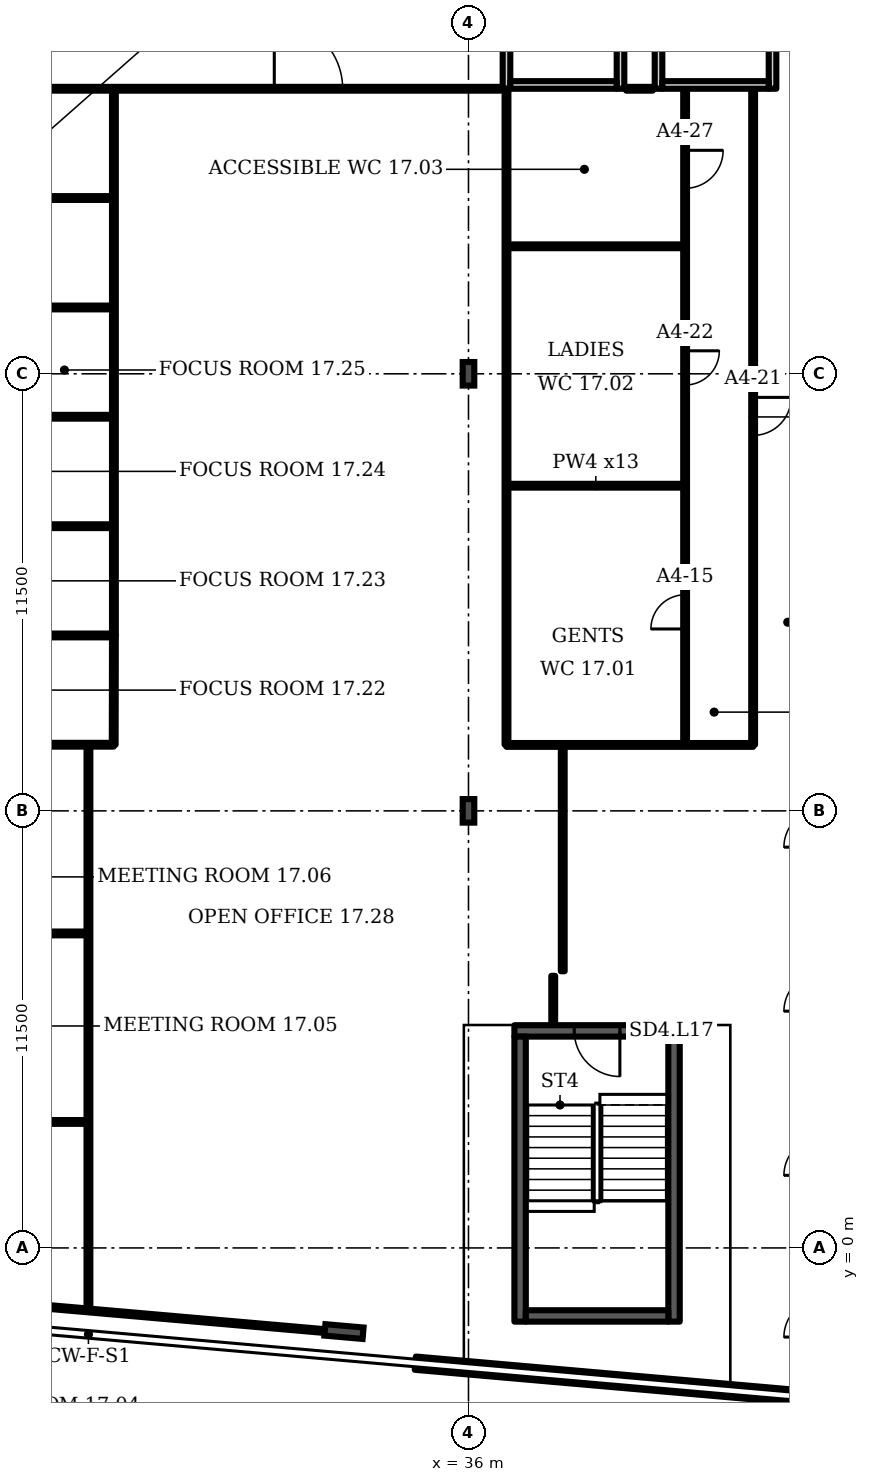
"""IFC4 building model, lengths in metres.
Left out: names, types, materials, properties, quantities, classifications, styles, units other than length and angle.
Written with IfcOpenShell. Run it as: python <this file> out.ifc"""

import sys

from ifc_helpers import new_model, si_unit, direction, frame, frame_2d, origin, origin_2d, place, context, subcontext, project, spatial, rectangle, i_section, extrude, element, fill, save


model = new_model("IFC4")
c1 = context("Model", 3, precision=1e-05, world=origin(), true_north=direction((0.0, 1.0)))
c2 = subcontext(c1, "Body", "Model", "MODEL_VIEW")
j1 = project(units=[si_unit("LENGTHUNIT", "METRE"), si_unit("PLANEANGLEUNIT", "RADIAN")], contexts=[c1])
p1 = place(None, origin())
s1 = spatial("IfcSite", under=j1, at=p1, CompositionType="ELEMENT")
p2 = place(p1, origin())
s2 = spatial("IfcBuilding", under=s1, at=p2, CompositionType="ELEMENT")
p3 = place(p2, frame((0.0, 0.0, 81.1)))
s3 = spatial("IfcBuildingStorey", under=s2, at=p3, CompositionType="ELEMENT", Elevation=81.1)
p4 = place(p3, frame((32.724, -2.2, 0.0), z_axis=(0.0, 0.0, 1.0), x_axis=(-0.087156, -0.996198, 0.0)))
e1 = element("IfcColumn", 1, at=p4, inside=s3, PredefinedType="COLUMN", context=c2, shape_type="SweptSolid", body=[
    extrude(i_section(OverallWidth=0.302, OverallDepth=1.008, WebThickness=0.021, FlangeThickness=0.04, FilletRadius=0.03, at=origin_2d()), origin(), (0.0, 0.0, 1.0), 3.6),
])
for number, where, z_axis, x_axis in (
    (2, (36.0, 11.5, 0.0), (0.0, 0.0, 1.0), (1.0, 0.0, 0.0)),
    (3, (36.0, 23.0, 0.0), (0.0, 0.0, 1.0), (1.0, 0.0, 0.0)),
):
    element("IfcColumn", number, at=place(p3, frame(where, z_axis=z_axis, x_axis=x_axis)), inside=s3, PredefinedType="COLUMN", context=c2, shape_type="SweptSolid", body=[
        extrude(i_section(OverallWidth=0.305, OverallDepth=0.62, WebThickness=0.021, FlangeThickness=0.04, FilletRadius=0.027, at=origin_2d()), origin(), (0.0, 0.0, 1.0), 3.6),
    ])
p5 = place(p3, frame((34.601, -3.032, 0.0), z_axis=(0.0, 0.0, 1.0), x_axis=(0.996193, -0.087148, 0.0)))
e4 = element("IfcWall", 4, at=p5, inside=s3, PredefinedType="SOLIDWALL", context=c2, shape_type="SweptSolid", body=[
    extrude(rectangle(XDim=11.458, YDim=0.35, at=frame_2d((5.729, 0.0))), origin(), (0.0, 0.0, 1.0), 1.0),
])
p6 = place(p3, frame((37.0, 30.5, 0.0), z_axis=(0.0, 0.0, 1.0), x_axis=(0.0, 1.0, 0.0)))
e5 = element("IfcWall", 5, at=p6, inside=s3, PredefinedType="PARTITIONING", context=c2, shape_type="SweptSolid", body=[
    extrude(rectangle(XDim=3.5, YDim=0.2, at=frame_2d((1.75, 0.0))), origin(), (0.0, 0.0, 1.0), 3.2),
])
p7 = place(p6, frame((1.2, 0.0, 0.0)))
e6 = element("IfcOpeningElement", 6, at=p7, cuts=e5, PredefinedType="OPENING", context=c2, shape_type="SweptSolid", body=[
    extrude(rectangle(XDim=1.1, YDim=2.1, at=frame_2d((0.55, 1.05))), frame((0.0, 0.11, 0.0), z_axis=(0.0, -1.0, 0.0), x_axis=(1.0, 0.0, 0.0)), (0.0, 0.0, 1.0), 0.22),
])
p8 = place(p3, frame((40.0, 30.5, 0.0), z_axis=(0.0, 0.0, 1.0), x_axis=(0.0, 1.0, 0.0)))
e7 = element("IfcWall", 7, at=p8, inside=s3, PredefinedType="PARTITIONING", context=c2, shape_type="SweptSolid", body=[
    extrude(rectangle(XDim=3.5, YDim=0.2, at=frame_2d((1.75, 0.0))), origin(), (0.0, 0.0, 1.0), 3.2),
])
p9 = place(p3, frame((37.1, 30.6, 0.0), z_axis=(0.0, 0.0, 1.0), x_axis=(1.0, 0.0, 0.0)))
e8 = element("IfcWall", 8, at=p9, inside=s3, PredefinedType="PARTITIONING", context=c2, shape_type="SweptSolid", body=[
    extrude(rectangle(XDim=2.8, YDim=0.2, at=frame_2d((1.4, 0.0))), origin(), (0.0, 0.0, 1.0), 3.2),
])
p10 = place(p3, frame((41.0, 30.5, 0.0), z_axis=(0.0, 0.0, 1.0), x_axis=(0.0, 1.0, 0.0)))
e9 = element("IfcWall", 9, at=p10, inside=s3, PredefinedType="PARTITIONING", context=c2, shape_type="SweptSolid", body=[
    extrude(rectangle(XDim=3.5, YDim=0.2, at=frame_2d((1.75, 0.0))), origin(), (0.0, 0.0, 1.0), 3.2),
])
p11 = place(p3, frame((44.0, 30.5, 0.0), z_axis=(0.0, 0.0, 1.0), x_axis=(0.0, 1.0, 0.0)))
e10 = element("IfcWall", 10, at=p11, inside=s3, PredefinedType="PARTITIONING", context=c2, shape_type="SweptSolid", body=[
    extrude(rectangle(XDim=3.5, YDim=0.2, at=frame_2d((1.75, 0.0))), origin(), (0.0, 0.0, 1.0), 3.2),
])
p12 = place(p11, frame((1.2, 0.0, 0.0)))
e11 = element("IfcOpeningElement", 11, at=p12, cuts=e10, PredefinedType="OPENING", context=c2, shape_type="SweptSolid", body=[
    extrude(rectangle(XDim=1.1, YDim=2.1, at=frame_2d((0.55, 1.05))), frame((0.0, 0.11, 0.0), z_axis=(0.0, -1.0, 0.0), x_axis=(1.0, 0.0, 0.0)), (0.0, 0.0, 1.0), 0.22),
])
p13 = place(p3, frame((41.1, 30.6, 0.0), z_axis=(0.0, 0.0, 1.0), x_axis=(1.0, 0.0, 0.0)))
e12 = element("IfcWall", 12, at=p13, inside=s3, PredefinedType="PARTITIONING", context=c2, shape_type="SweptSolid", body=[
    extrude(rectangle(XDim=2.8, YDim=0.2, at=frame_2d((1.4, 0.0))), origin(), (0.0, 0.0, 1.0), 3.2),
])
p14 = place(p3, frame((37.208, 5.711, 0.0), z_axis=(0.0, 0.0, 1.0), x_axis=(1.0, 0.0, 0.0)))
e13 = element("IfcWall", 13, at=p14, inside=s3, PredefinedType="SHEAR", context=c2, shape_type="SweptSolid", body=[
    extrude(rectangle(XDim=4.35, YDim=0.3, at=frame_2d((2.175, 0.0))), origin(), (0.0, 0.0, 1.0), 3.2),
])
p15 = place(p14, frame((1.575, 0.0, 0.0)))
e14 = element("IfcOpeningElement", 14, at=p15, cuts=e13, PredefinedType="OPENING", context=c2, shape_type="SweptSolid", body=[
    extrude(rectangle(XDim=1.2, YDim=2.1, at=frame_2d((0.6, 1.05))), frame((0.0, 0.16, 0.0), z_axis=(0.0, -1.0, 0.0), x_axis=(1.0, 0.0, 0.0)), (0.0, 0.0, 1.0), 0.32),
])
for number, where, z_axis, x_axis in (
    (15, (21.94, 3.315, 0.0), (0.0, 0.0, 1.0), (1.0, 0.0, 0.0)),
    (16, (21.94, 8.275, 0.0), (0.0, 0.0, 1.0), (1.0, 0.0, 0.0)),
):
    element("IfcWall", number, at=place(p3, frame(where, z_axis=z_axis, x_axis=x_axis)), inside=s3, PredefinedType="PARTITIONING", context=c2, shape_type="SweptSolid", body=[
        extrude(rectangle(XDim=4.06, YDim=0.1, at=frame_2d((2.03, 0.0))), origin(), (0.0, 0.0, 1.0), 3.2),
    ])
for number, where, z_axis, x_axis in (
    (17, (21.94, 13.24, 0.0), (0.0, 0.0, 1.0), (1.0, 0.0, 0.0)),
    (18, (21.94, 16.115, 0.0), (0.0, 0.0, 1.0), (1.0, 0.0, 0.0)),
    (19, (21.94, 18.99, 0.0), (0.0, 0.0, 1.0), (1.0, 0.0, 0.0)),
    (20, (21.94, 21.87, 0.0), (0.0, 0.0, 1.0), (1.0, 0.0, 0.0)),
    (21, (21.94, 24.745, 0.0), (0.0, 0.0, 1.0), (1.0, 0.0, 0.0)),
    (22, (21.94, 27.625, 0.0), (0.0, 0.0, 1.0), (1.0, 0.0, 0.0)),
):
    element("IfcWall", number, at=place(p3, frame(where, z_axis=z_axis, x_axis=x_axis)), inside=s3, PredefinedType="PARTITIONING", context=c2, shape_type="SweptSolid", body=[
        extrude(rectangle(XDim=4.725, YDim=0.1, at=frame_2d((2.363, 0.0))), origin(), (0.0, 0.0, 1.0), 3.2),
    ])
p16 = place(p3, frame((21.94, 30.5, 0.0), z_axis=(0.0, 0.0, 1.0), x_axis=(1.0, 0.0, 0.0)))
e23 = element("IfcWall", 23, at=p16, inside=s3, PredefinedType="PARTITIONING", context=c2, shape_type="SweptSolid", body=[
    extrude(rectangle(XDim=14.91, YDim=0.1, at=frame_2d((7.455, 0.0))), origin(), (0.0, 0.0, 1.0), 3.2),
])
p17 = place(p16, frame((0.345, 0.0, 0.0)))
e24 = element("IfcOpeningElement", 24, at=p17, cuts=e23, PredefinedType="OPENING", context=c2, shape_type="SweptSolid", body=[
    extrude(rectangle(XDim=1.0, YDim=2.1, at=frame_2d((0.5, 1.05))), frame((0.0, 0.06, 0.0), z_axis=(0.0, -1.0, 0.0), x_axis=(1.0, 0.0, 0.0)), (0.0, 0.0, 1.0), 0.12),
])
p18 = place(p16, frame((8.95, 0.0, 0.0)))
e25 = element("IfcOpeningElement", 25, at=p18, cuts=e23, PredefinedType="OPENING", context=c2, shape_type="SweptSolid", body=[
    extrude(rectangle(XDim=1.8, YDim=2.1, at=frame_2d((0.9, 1.05))), frame((0.0, 0.06, 0.0), z_axis=(0.0, -1.0, 0.0), x_axis=(1.0, 0.0, 0.0)), (0.0, 0.0, 1.0), 0.12),
])
p19 = place(p3, frame((26.0, -1.645, 0.0), z_axis=(0.0, 0.0, 1.0), x_axis=(0.0, 1.0, 0.0)))
e26 = element("IfcWall", 26, at=p19, inside=s3, PredefinedType="PARTITIONING", context=c2, shape_type="SweptSolid", body=[
    extrude(rectangle(XDim=14.885, YDim=0.1, at=frame_2d((7.442, 0.0))), origin(), (0.0, 0.0, 1.0), 3.2),
])
p20 = place(p3, frame((26.665, 13.24, 0.0), z_axis=(0.0, 0.0, 1.0), x_axis=(0.001698, 0.999995, 0.0)))
e27 = element("IfcWall", 27, at=p20, inside=s3, PredefinedType="PARTITIONING", context=c2, shape_type="SweptSolid", body=[
    extrude(rectangle(XDim=2.875, YDim=0.1, at=frame_2d((1.438, 0.0))), origin(), (0.0, 0.0, 1.0), 3.2),
])
p21 = place(p3, frame((26.67, 16.115, 0.0), z_axis=(0.0, 0.0, 1.0), x_axis=(0.0, 1.0, 0.0)))
e28 = element("IfcWall", 28, at=p21, inside=s3, PredefinedType="PARTITIONING", context=c2, shape_type="SweptSolid", body=[
    extrude(rectangle(XDim=14.385, YDim=0.1, at=frame_2d((7.192, 0.0))), origin(), (0.0, 0.0, 1.0), 3.2),
])
p22 = place(p3, frame((33.22, -2.275, 0.0), z_axis=(0.0, 0.0, 1.0), x_axis=(-0.996212, 0.086913, 0.0)))
e29 = element("IfcWall", 29, at=p22, inside=s3, PredefinedType="PARTITIONING", context=c2, shape_type="SweptSolid", body=[
    extrude(rectangle(XDim=11.323, YDim=0.1, at=frame_2d((5.662, 0.0))), origin(), (0.0, 0.0, 1.0), 2.58),
])
p23 = place(p3, frame((37.0, 13.235, 0.0), z_axis=(0.0, 0.0, 1.0), x_axis=(1.0, 0.0, 0.0)))
e30 = element("IfcWall", 30, at=p23, inside=s3, PredefinedType="PARTITIONING", context=c2, shape_type="SweptSolid", body=[
    extrude(rectangle(XDim=6.49, YDim=0.1, at=frame_2d((3.245, 0.0))), origin(), (0.0, 0.0, 1.0), 3.2),
])
p24 = place(p3, frame((37.0, 13.24, 0.0), z_axis=(0.0, 0.0, 1.0), x_axis=(0.0, 1.0, 0.0)))
e31 = element("IfcWall", 31, at=p24, inside=s3, PredefinedType="PARTITIONING", context=c2, shape_type="SweptSolid", body=[
    extrude(rectangle(XDim=17.26, YDim=0.1, at=frame_2d((8.63, 0.0))), origin(), (0.0, 0.0, 1.0), 3.2),
])
for number, where, z_axis, x_axis in (
    (32, (37.0, 20.055, 0.0), (0.0, 0.0, 1.0), (1.0, 0.0, 0.0)),
    (33, (37.0, 26.355, 0.0), (0.0, 0.0, 1.0), (1.0, 0.0, 0.0)),
):
    element("IfcWall", number, at=place(p3, frame(where, z_axis=z_axis, x_axis=x_axis)), inside=s3, PredefinedType="PARTITIONING", context=c2, shape_type="SweptSolid", body=[
        extrude(rectangle(XDim=4.7, YDim=0.1, at=frame_2d((2.35, 0.0))), origin(), (0.0, 0.0, 1.0), 3.2),
    ])
p25 = place(p3, frame((38.23, 5.881, 0.0), z_axis=(0.0, 0.0, 1.0), x_axis=(0.0, 1.0, 0.0)))
e34 = element("IfcWall", 34, at=p25, inside=s3, PredefinedType="PARTITIONING", context=c2, shape_type="SweptSolid", body=[
    extrude(rectangle(XDim=1.279, YDim=0.1, at=frame_2d((0.64, 0.0))), origin(), (0.0, 0.0, 1.0), 3.2),
])
p26 = place(p3, frame((38.48, 7.28, 0.0), z_axis=(0.0, 0.0, 1.0), x_axis=(0.0, 1.0, 0.0)))
e35 = element("IfcWall", 35, at=p26, inside=s3, PredefinedType="PARTITIONING", context=c2, shape_type="SweptSolid", body=[
    extrude(rectangle(XDim=5.955, YDim=0.1, at=frame_2d((2.978, 0.0))), origin(), (0.0, 0.0, 1.0), 3.2),
])
p27 = place(p3, frame((41.7, 13.24, 0.0), z_axis=(0.0, 0.0, 1.0), x_axis=(0.0, 1.0, 0.0)))
e36 = element("IfcWall", 36, at=p27, inside=s3, PredefinedType="PARTITIONING", context=c2, shape_type="SweptSolid", body=[
    extrude(rectangle(XDim=17.25, YDim=0.1, at=frame_2d((8.625, 0.0))), origin(), (0.0, 0.0, 1.0), 3.2),
])
p28 = place(p27, frame((3.046, 0.0, 0.0)))
e37 = element("IfcOpeningElement", 37, at=p28, cuts=e36, PredefinedType="OPENING", context=c2, shape_type="SweptSolid", body=[
    extrude(rectangle(XDim=0.9, YDim=2.1, at=frame_2d((0.45, 1.05))), frame((0.0, 0.06, 0.0), z_axis=(0.0, -1.0, 0.0), x_axis=(1.0, 0.0, 0.0)), (0.0, 0.0, 1.0), 0.12),
])
p29 = place(p27, frame((9.465, 0.0, 0.0)))
e38 = element("IfcOpeningElement", 38, at=p29, cuts=e36, PredefinedType="OPENING", context=c2, shape_type="SweptSolid", body=[
    extrude(rectangle(XDim=0.9, YDim=2.1, at=frame_2d((0.45, 1.05))), frame((0.0, 0.06, 0.0), z_axis=(0.0, -1.0, 0.0), x_axis=(1.0, 0.0, 0.0)), (0.0, 0.0, 1.0), 0.12),
])
p30 = place(p27, frame((14.64, 0.0, 0.0)))
e39 = element("IfcOpeningElement", 39, at=p30, cuts=e36, PredefinedType="OPENING", context=c2, shape_type="SweptSolid", body=[
    extrude(rectangle(XDim=1.0, YDim=2.1, at=frame_2d((0.5, 1.05))), frame((0.0, 0.06, 0.0), z_axis=(0.0, -1.0, 0.0), x_axis=(1.0, 0.0, 0.0)), (0.0, 0.0, 1.0), 0.12),
])
p31 = place(p3, frame((43.49, 13.24, 0.0), z_axis=(0.0, 0.0, 1.0), x_axis=(0.0, 1.0, 0.0)))
e40 = element("IfcWall", 40, at=p31, inside=s3, PredefinedType="PARTITIONING", context=c2, shape_type="SweptSolid", body=[
    extrude(rectangle(XDim=17.25, YDim=0.1, at=frame_2d((8.625, 0.0))), origin(), (0.0, 0.0, 1.0), 3.2),
])
p32 = place(p31, frame((8.139, 0.0, 0.0)))
e41 = element("IfcOpeningElement", 41, at=p32, cuts=e40, PredefinedType="OPENING", context=c2, shape_type="SweptSolid", body=[
    extrude(rectangle(XDim=1.0, YDim=2.1, at=frame_2d((0.5, 1.05))), frame((0.0, 0.06, 0.0), z_axis=(0.0, -1.0, 0.0), x_axis=(1.0, 0.0, 0.0)), (0.0, 0.0, 1.0), 0.12),
])
p33 = place(p3, frame((40.15, 30.5, 0.0), z_axis=(0.0, 0.0, 1.0), x_axis=(1.0, 0.0, 0.0)))
e42 = element("IfcWall", 42, at=p33, inside=s3, PredefinedType="PARTITIONING", context=c2, shape_type="SweptSolid", body=[
    extrude(rectangle(XDim=0.7, YDim=0.1, at=frame_2d((0.35, 0.0))), origin(), (0.0, 0.0, 1.0), 3.2),
])
for number, where, z_axis, x_axis in (
    (43, (37.358, -1.939, 0.0), (0.0, 0.0, 1.0), (0.0, 1.0, 0.0)),
    (44, (41.408, -1.939, 0.0), (0.0, 0.0, 1.0), (0.0, 1.0, 0.0)),
):
    element("IfcWall", number, at=place(p3, frame(where, z_axis=z_axis, x_axis=x_axis)), inside=s3, PredefinedType="SHEAR", context=c2, shape_type="SweptSolid", body=[
        extrude(rectangle(XDim=7.5, YDim=0.3, at=frame_2d((3.75, 0.0))), origin(), (0.0, 0.0, 1.0), 3.2),
    ])
p34 = place(p3, frame((37.508, -1.789, 0.0), z_axis=(0.0, 0.0, 1.0), x_axis=(1.0, 0.0, 0.0)))
e45 = element("IfcWall", 45, at=p34, inside=s3, PredefinedType="SHEAR", context=c2, shape_type="SweptSolid", body=[
    extrude(rectangle(XDim=3.75, YDim=0.3, at=frame_2d((1.875, 0.0))), origin(), (0.0, 0.0, 1.0), 3.2),
])
p35 = place(p15, origin())
e46 = element("IfcDoor", 46, at=p35, inside=s3, OperationType="SINGLE_SWING_RIGHT", PredefinedType="DOOR", context=c2, shape_type="SweptSolid", body=[
    extrude(rectangle(XDim=1.2, YDim=2.1, at=frame_2d((0.6, 1.05))), frame((0.0, 0.025, 0.0), z_axis=(0.0, -1.0, 0.0), x_axis=(1.0, 0.0, 0.0)), (0.0, 0.0, 1.0), 0.05),
])
fill(e14, e46)
p36 = place(p28, origin())
e47 = element("IfcDoor", 47, at=p36, inside=s3, OperationType="SINGLE_SWING_LEFT", PredefinedType="DOOR", context=c2, shape_type="SweptSolid", body=[
    extrude(rectangle(XDim=0.9, YDim=2.1, at=frame_2d((0.45, 1.05))), frame((0.0, 0.025, 0.0), z_axis=(0.0, -1.0, 0.0), x_axis=(1.0, 0.0, 0.0)), (0.0, 0.0, 1.0), 0.05),
])
fill(e37, e47)
p37 = place(p32, origin())
e48 = element("IfcDoor", 48, at=p37, inside=s3, OperationType="SINGLE_SWING_RIGHT", PredefinedType="DOOR", context=c2, shape_type="SweptSolid", body=[
    extrude(rectangle(XDim=1.0, YDim=2.1, at=frame_2d((0.5, 1.05))), frame((0.0, 0.025, 0.0), z_axis=(0.0, -1.0, 0.0), x_axis=(1.0, 0.0, 0.0)), (0.0, 0.0, 1.0), 0.05),
])
fill(e41, e48)
p38 = place(p29, origin())
e49 = element("IfcDoor", 49, at=p38, inside=s3, OperationType="SINGLE_SWING_RIGHT", PredefinedType="DOOR", context=c2, shape_type="SweptSolid", body=[
    extrude(rectangle(XDim=0.9, YDim=2.1, at=frame_2d((0.45, 1.05))), frame((0.0, 0.025, 0.0), z_axis=(0.0, -1.0, 0.0), x_axis=(1.0, 0.0, 0.0)), (0.0, 0.0, 1.0), 0.05),
])
fill(e38, e49)
p39 = place(p30, origin())
e50 = element("IfcDoor", 50, at=p39, inside=s3, OperationType="SINGLE_SWING_RIGHT", PredefinedType="DOOR", context=c2, shape_type="SweptSolid", body=[
    extrude(rectangle(XDim=1.0, YDim=2.1, at=frame_2d((0.5, 1.05))), frame((0.0, 0.025, 0.0), z_axis=(0.0, -1.0, 0.0), x_axis=(1.0, 0.0, 0.0)), (0.0, 0.0, 1.0), 0.05),
])
fill(e39, e50)
p40 = place(p18, origin())
e51 = element("IfcDoor", 51, at=p40, inside=s3, OperationType="DOUBLE_DOOR_SINGLE_SWING", PredefinedType="DOOR", context=c2, shape_type="SweptSolid", body=[
    extrude(rectangle(XDim=1.8, YDim=2.1, at=frame_2d((0.9, 1.05))), frame((0.0, 0.025, 0.0), z_axis=(0.0, -1.0, 0.0), x_axis=(1.0, 0.0, 0.0)), (0.0, 0.0, 1.0), 0.05),
])
fill(e25, e51)
save(model, sys.argv[1])
